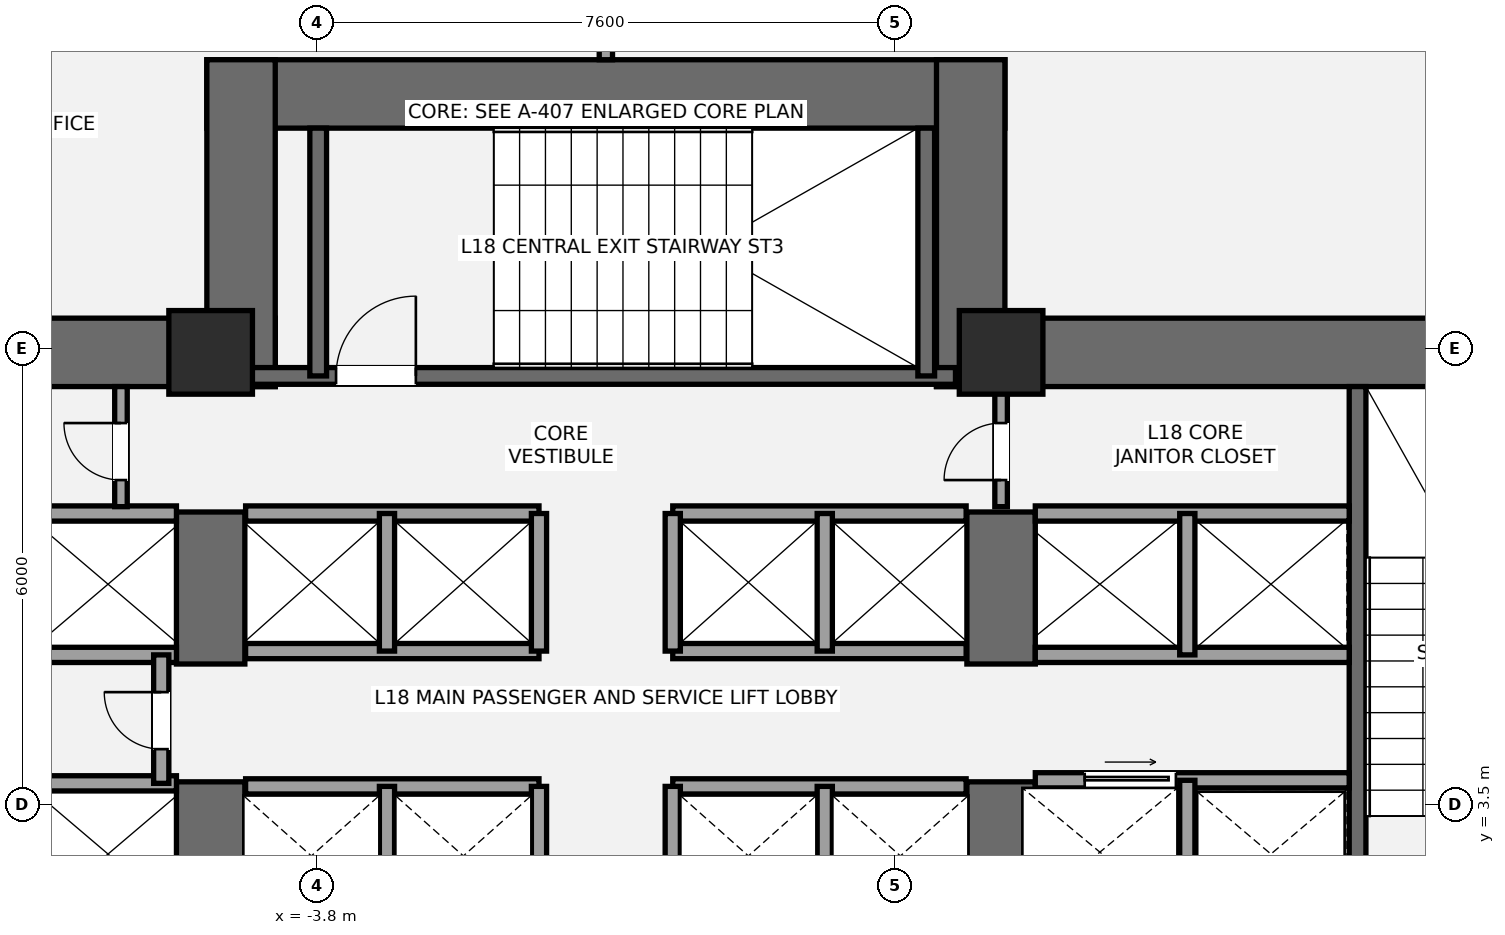
"""IFC4 building model, lengths in metres.
Left out: names, types, materials, properties, quantities, classifications, styles, units other than length and angle.
Written with IfcOpenShell. Run it as: python <this file> out.ifc"""

import sys

from ifc_helpers import new_model, si_unit, direction, frame, frame_2d, origin, origin_2d, place, context, subcontext, project, spatial, rectangle, extrude, element, fill, save


model = new_model("IFC4")
c1 = context("Model", 3, precision=1e-05, world=origin(), true_north=direction((0.0, 1.0)))
c2 = subcontext(c1, "Body", "Model", "MODEL_VIEW")
j1 = project(units=[si_unit("LENGTHUNIT", "METRE"), si_unit("PLANEANGLEUNIT", "RADIAN")], contexts=[c1])
p1 = place(None, origin())
s1 = spatial("IfcSite", under=j1, at=p1, CompositionType="ELEMENT")
p2 = place(p1, origin())
s2 = spatial("IfcBuilding", under=s1, at=p2, CompositionType="ELEMENT")
p3 = place(p2, frame((0.0, 0.0, 70.2)))
s3 = spatial("IfcBuildingStorey", under=s2, at=p3, CompositionType="ELEMENT", Elevation=70.2)
p4 = place(p3, frame((-14.05, 9.45, 0.0), z_axis=(0.0, 0.0, 1.0), x_axis=(1.0, 0.0, 0.0)))
e1 = element("IfcWall", 1, at=p4, inside=s3, PredefinedType="SHEAR", context=c2, shape_type="SweptSolid", body=[
    extrude(rectangle(XDim=9.7, YDim=0.9, at=frame_2d((4.85, 0.0))), origin(), (0.0, 0.0, 1.0), 3.6),
])
p5 = place(p3, frame((-5.2, 0.95, 0.0), z_axis=(0.0, 0.0, 1.0), x_axis=(0.0, 1.0, 0.0)))
e2 = element("IfcWall", 2, at=p5, inside=s3, PredefinedType="SHEAR", context=c2, shape_type="SweptSolid", body=[
    extrude(rectangle(XDim=2.85, YDim=0.9, at=frame_2d((1.425, 0.0))), origin(), (0.0, 0.0, 1.0), 3.6),
])
p6 = place(p3, frame((-5.2, 5.35, 0.0), z_axis=(0.0, 0.0, 1.0), x_axis=(0.0, 1.0, 0.0)))
e3 = element("IfcWall", 3, at=p6, inside=s3, PredefinedType="SHEAR", context=c2, shape_type="SweptSolid", body=[
    extrude(rectangle(XDim=2.0, YDim=0.9, at=frame_2d((1.0, 0.0))), origin(), (0.0, 0.0, 1.0), 3.6),
])
p7 = place(p3, frame((4.35, 9.45, 0.0), z_axis=(0.0, 0.0, 1.0), x_axis=(1.0, 0.0, 0.0)))
e4 = element("IfcWall", 4, at=p7, inside=s3, PredefinedType="SHEAR", context=c2, shape_type="SweptSolid", body=[
    extrude(rectangle(XDim=9.7, YDim=0.9, at=frame_2d((4.85, 0.0))), origin(), (0.0, 0.0, 1.0), 3.6),
])
p8 = place(p3, frame((5.2, 0.95, 0.0), z_axis=(0.0, 0.0, 1.0), x_axis=(0.0, 1.0, 0.0)))
e5 = element("IfcWall", 5, at=p8, inside=s3, PredefinedType="SHEAR", context=c2, shape_type="SweptSolid", body=[
    extrude(rectangle(XDim=2.85, YDim=0.9, at=frame_2d((1.425, 0.0))), origin(), (0.0, 0.0, 1.0), 3.6),
])
p9 = place(p3, frame((5.2, 5.35, 0.0), z_axis=(0.0, 0.0, 1.0), x_axis=(0.0, 1.0, 0.0)))
e6 = element("IfcWall", 6, at=p9, inside=s3, PredefinedType="SHEAR", context=c2, shape_type="SweptSolid", body=[
    extrude(rectangle(XDim=2.0, YDim=0.9, at=frame_2d((1.0, 0.0))), origin(), (0.0, 0.0, 1.0), 3.6),
])
p10 = place(p3, frame((9.89, 1.85, 0.0), z_axis=(0.0, 0.0, 1.0), x_axis=(0.0, 1.0, 0.0)))
e7 = element("IfcWall", 7, at=p10, inside=s3, PredefinedType="SHEAR", context=c2, shape_type="SweptSolid", body=[
    extrude(rectangle(XDim=7.15, YDim=0.22, at=frame_2d((3.575, 0.0))), origin(), (0.0, 0.0, 1.0), 3.6),
])
p11 = place(p3, frame((-5.25, 12.85, 0.0), z_axis=(0.0, 0.0, 1.0), x_axis=(1.0, 0.0, 0.0)))
e8 = element("IfcWall", 8, at=p11, inside=s3, PredefinedType="SHEAR", context=c2, shape_type="SweptSolid", body=[
    extrude(rectangle(XDim=10.5, YDim=0.9, at=frame_2d((5.25, 0.0))), origin(), (0.0, 0.0, 1.0), 3.6),
])
for number, where, z_axis, x_axis in (
    (9, (-4.8, 9.0, 0.0), (0.0, 0.0, 1.0), (0.0, 1.0, 0.0)),
    (10, (4.8, 9.0, 0.0), (0.0, 0.0, 1.0), (0.0, 1.0, 0.0)),
):
    element("IfcWall", number, at=place(p3, frame(where, z_axis=z_axis, x_axis=x_axis)), inside=s3, PredefinedType="SHEAR", context=c2, shape_type="SweptSolid", body=[
        extrude(rectangle(XDim=4.3, YDim=0.9, at=frame_2d((2.15, 0.0))), origin(), (0.0, 0.0, 1.0), 3.6),
    ])
p12 = place(p3, frame((-4.7, 9.14, 0.0), z_axis=(0.0, 0.0, 1.0), x_axis=(1.0, 0.0, 0.0)))
e11 = element("IfcWall", 11, at=p12, inside=s3, PredefinedType="SHEAR", context=c2, shape_type="SweptSolid", body=[
    extrude(rectangle(XDim=9.3, YDim=0.22, at=frame_2d((4.65, 0.0))), origin(), (0.0, 0.0, 1.0), 3.6),
])
p13 = place(p12, frame((1.15, 0.0, 0.0)))
e12 = element("IfcOpeningElement", 12, at=p13, cuts=e11, PredefinedType="OPENING", context=c2, shape_type="SweptSolid", body=[
    extrude(rectangle(XDim=1.05, YDim=2.15, at=frame_2d((0.525, 1.075))), frame((0.0, 0.12, 0.0), z_axis=(0.0, -1.0, 0.0), x_axis=(1.0, 0.0, 0.0)), (0.0, 0.0, 1.0), 0.24),
])
for number, where, z_axis, x_axis in (
    (13, (-3.785, 9.14, 0.0), (0.0, 0.0, 1.0), (0.0, 1.0, 0.0)),
    (14, (4.215, 9.14, 0.0), (0.0, 0.0, 1.0), (0.0, 1.0, 0.0)),
):
    element("IfcWall", number, at=place(p3, frame(where, z_axis=z_axis, x_axis=x_axis)), inside=s3, PredefinedType="SHEAR", context=c2, shape_type="SweptSolid", body=[
        extrude(rectangle(XDim=3.26, YDim=0.22, at=frame_2d((1.63, 0.0))), origin(), (0.0, 0.0, 1.0), 3.6),
    ])
for number, where, z_axis, x_axis in (
    (15, (-5.2, 9.45, 0.0), (0.0, 0.0, 1.0), (1.0, 0.0, 0.0)),
    (16, (5.2, 9.45, 0.0), (0.0, 0.0, 1.0), (1.0, 0.0, 0.0)),
):
    element("IfcColumn", number, at=place(p3, frame(where, z_axis=z_axis, x_axis=x_axis)), inside=s3, PredefinedType="COLUMN", context=c2, shape_type="SweptSolid", body=[
        extrude(rectangle(XDim=1.1, YDim=1.1, at=origin_2d()), origin(), (0.0, 0.0, 1.0), 3.6),
    ])
for number, where, z_axis, x_axis in (
    (17, (-9.78, 3.78, 0.0), (0.0, 0.0, 1.0), (1.0, 0.0, 0.0)),
    (18, (-9.78, 5.47, 0.0), (0.0, 0.0, 1.0), (1.0, 0.0, 0.0)),
    (19, (-9.78, 7.33, 0.0), (0.0, 0.0, 1.0), (1.0, 0.0, 0.0)),
):
    element("IfcWall", number, at=place(p3, frame(where, z_axis=z_axis, x_axis=x_axis)), inside=s3, PredefinedType="SOLIDWALL", context=c2, shape_type="SweptSolid", body=[
        extrude(rectangle(XDim=4.13, YDim=0.2, at=frame_2d((2.065, 0.0))), origin(), (0.0, 0.0, 1.0), 3.4),
    ])
p14 = place(p3, frame((-5.85, 3.78, 0.0), z_axis=(0.0, 0.0, 1.0), x_axis=(0.0, 1.0, 0.0)))
e20 = element("IfcWall", 20, at=p14, inside=s3, PredefinedType="SOLIDWALL", context=c2, shape_type="SweptSolid", body=[
    extrude(rectangle(XDim=1.69, YDim=0.2, at=frame_2d((0.845, 0.0))), origin(), (0.0, 0.0, 1.0), 3.4),
])
p15 = place(p14, frame((0.45, 0.0, 0.0)))
e21 = element("IfcOpeningElement", 21, at=p15, cuts=e20, PredefinedType="OPENING", context=c2, shape_type="SweptSolid", body=[
    extrude(rectangle(XDim=0.75, YDim=2.1, at=frame_2d((0.375, 1.05))), frame((0.0, 0.11, 0.0), z_axis=(0.0, -1.0, 0.0), x_axis=(1.0, 0.0, 0.0)), (0.0, 0.0, 1.0), 0.22),
])
p16 = place(p3, frame((5.65, 3.82, 0.0), z_axis=(0.0, 0.0, 1.0), x_axis=(1.0, 0.0, 0.0)))
e22 = element("IfcWall", 22, at=p16, inside=s3, PredefinedType="SOLIDWALL", context=c2, shape_type="SweptSolid", body=[
    extrude(rectangle(XDim=4.13, YDim=0.2, at=frame_2d((2.065, 0.0))), origin(), (0.0, 0.0, 1.0), 3.4),
])
p17 = place(p16, frame((0.65, 0.0, 0.0)))
e23 = element("IfcOpeningElement", 23, at=p17, cuts=e22, PredefinedType="OPENING", context=c2, shape_type="SweptSolid", body=[
    extrude(rectangle(XDim=1.2, YDim=2.2, at=frame_2d((0.6, 1.1))), frame((0.0, 0.11, 0.0), z_axis=(0.0, -1.0, 0.0), x_axis=(1.0, 0.0, 0.0)), (0.0, 0.0, 1.0), 0.22),
])
p18 = place(p3, frame((7.65, 1.85, 0.0), z_axis=(0.0, 0.0, 1.0), x_axis=(0.0, 1.0, 0.0)))
e24 = element("IfcWall", 24, at=p18, inside=s3, PredefinedType="SOLIDWALL", context=c2, shape_type="SweptSolid", body=[
    extrude(rectangle(XDim=1.97, YDim=0.2, at=frame_2d((0.985, 0.0))), origin(), (0.0, 0.0, 1.0), 3.4),
])
for number, where, z_axis, x_axis in (
    (25, (5.65, 5.47, 0.0), (0.0, 0.0, 1.0), (1.0, 0.0, 0.0)),
    (26, (5.65, 7.33, 0.0), (0.0, 0.0, 1.0), (1.0, 0.0, 0.0)),
):
    element("IfcWall", number, at=place(p3, frame(where, z_axis=z_axis, x_axis=x_axis)), inside=s3, PredefinedType="SOLIDWALL", context=c2, shape_type="SweptSolid", body=[
        extrude(rectangle(XDim=4.13, YDim=0.2, at=frame_2d((2.065, 0.0))), origin(), (0.0, 0.0, 1.0), 3.4),
    ])
p19 = place(p3, frame((7.65, 5.47, 0.0), z_axis=(0.0, 0.0, 1.0), x_axis=(0.0, 1.0, 0.0)))
e27 = element("IfcWall", 27, at=p19, inside=s3, PredefinedType="SOLIDWALL", context=c2, shape_type="SweptSolid", body=[
    extrude(rectangle(XDim=1.86, YDim=0.2, at=frame_2d((0.93, 0.0))), origin(), (0.0, 0.0, 1.0), 3.4),
])
for number, where, z_axis, x_axis in (
    (28, (-4.74, 3.74, 0.0), (0.0, 0.0, 1.0), (1.0, 0.0, 0.0)),
    (29, (0.88, 3.74, 0.0), (0.0, 0.0, 1.0), (1.0, 0.0, 0.0)),
):
    element("IfcWall", number, at=place(p3, frame(where, z_axis=z_axis, x_axis=x_axis)), inside=s3, PredefinedType="SOLIDWALL", context=c2, shape_type="SweptSolid", body=[
        extrude(rectangle(XDim=3.86, YDim=0.2, at=frame_2d((1.93, 0.0))), origin(), (0.0, 0.0, 1.0), 3.4),
    ])
for number, where, z_axis, x_axis in (
    (30, (-2.88, 1.92, 0.0), (0.0, 0.0, 1.0), (0.0, 1.0, 0.0)),
    (31, (2.88, 1.92, 0.0), (0.0, 0.0, 1.0), (0.0, 1.0, 0.0)),
    (32, (-0.88, 1.92, 0.0), (0.0, 0.0, 1.0), (0.0, 1.0, 0.0)),
    (33, (0.88, 1.92, 0.0), (0.0, 0.0, 1.0), (0.0, 1.0, 0.0)),
):
    element("IfcWall", number, at=place(p3, frame(where, z_axis=z_axis, x_axis=x_axis)), inside=s3, PredefinedType="SOLIDWALL", context=c2, shape_type="SweptSolid", body=[
        extrude(rectangle(XDim=1.82, YDim=0.2, at=frame_2d((0.91, 0.0))), origin(), (0.0, 0.0, 1.0), 3.4),
    ])
for number, where, z_axis, x_axis in (
    (34, (-4.74, 5.52, 0.0), (0.0, 0.0, 1.0), (1.0, 0.0, 0.0)),
    (35, (0.88, 5.52, 0.0), (0.0, 0.0, 1.0), (1.0, 0.0, 0.0)),
    (36, (-4.74, 7.33, 0.0), (0.0, 0.0, 1.0), (1.0, 0.0, 0.0)),
    (37, (0.88, 7.33, 0.0), (0.0, 0.0, 1.0), (1.0, 0.0, 0.0)),
):
    element("IfcWall", number, at=place(p3, frame(where, z_axis=z_axis, x_axis=x_axis)), inside=s3, PredefinedType="SOLIDWALL", context=c2, shape_type="SweptSolid", body=[
        extrude(rectangle(XDim=3.86, YDim=0.2, at=frame_2d((1.93, 0.0))), origin(), (0.0, 0.0, 1.0), 3.4),
    ])
for number, where, z_axis, x_axis in (
    (38, (-2.88, 5.52, 0.0), (0.0, 0.0, 1.0), (0.0, 1.0, 0.0)),
    (39, (2.88, 5.52, 0.0), (0.0, 0.0, 1.0), (0.0, 1.0, 0.0)),
    (40, (-0.88, 5.52, 0.0), (0.0, 0.0, 1.0), (0.0, 1.0, 0.0)),
    (41, (0.88, 5.52, 0.0), (0.0, 0.0, 1.0), (0.0, 1.0, 0.0)),
):
    element("IfcWall", number, at=place(p3, frame(where, z_axis=z_axis, x_axis=x_axis)), inside=s3, PredefinedType="SOLIDWALL", context=c2, shape_type="SweptSolid", body=[
        extrude(rectangle(XDim=1.81, YDim=0.2, at=frame_2d((0.905, 0.0))), origin(), (0.0, 0.0, 1.0), 3.4),
    ])
p20 = place(p3, frame((-6.38, 7.42, 0.0), z_axis=(0.0, 0.0, 1.0), x_axis=(0.0, 1.0, 0.0)))
e42 = element("IfcWall", 42, at=p20, inside=s3, PredefinedType="PARTITIONING", context=c2, shape_type="SweptSolid", body=[
    extrude(rectangle(XDim=1.58, YDim=0.165, at=frame_2d((0.79, 0.0))), origin(), (0.0, 0.0, 1.0), 3.4),
])
p21 = place(p20, frame((0.35, 0.0, 0.0)))
e43 = element("IfcOpeningElement", 43, at=p21, cuts=e42, PredefinedType="OPENING", context=c2, shape_type="SweptSolid", body=[
    extrude(rectangle(XDim=0.75, YDim=2.1, at=frame_2d((0.375, 1.05))), frame((0.0, 0.093, 0.0), z_axis=(0.0, -1.0, 0.0), x_axis=(1.0, 0.0, 0.0)), (0.0, 0.0, 1.0), 0.185),
])
p22 = place(p3, frame((5.2, 7.42, 0.0), z_axis=(0.0, 0.0, 1.0), x_axis=(0.0, 1.0, 0.0)))
e44 = element("IfcWall", 44, at=p22, inside=s3, PredefinedType="PARTITIONING", context=c2, shape_type="SweptSolid", body=[
    extrude(rectangle(XDim=1.58, YDim=0.165, at=frame_2d((0.79, 0.0))), origin(), (0.0, 0.0, 1.0), 3.4),
])
p23 = place(p22, frame((0.35, 0.0, 0.0)))
e45 = element("IfcOpeningElement", 45, at=p23, cuts=e44, PredefinedType="OPENING", context=c2, shape_type="SweptSolid", body=[
    extrude(rectangle(XDim=0.75, YDim=2.1, at=frame_2d((0.375, 1.05))), frame((0.0, 0.093, 0.0), z_axis=(0.0, -1.0, 0.0), x_axis=(1.0, 0.0, 0.0)), (0.0, 0.0, 1.0), 0.185),
])
p24 = place(p3, frame((0.0, 13.3, 0.0), z_axis=(0.0, 0.0, 1.0), x_axis=(0.0, 1.0, 0.0)))
e46 = element("IfcWall", 46, at=p24, inside=s3, PredefinedType="PARTITIONING", context=c2, shape_type="SweptSolid", body=[
    extrude(rectangle(XDim=4.31, YDim=0.175, at=frame_2d((2.155, 0.0))), origin(), (0.0, 0.0, 1.0), 3.4),
])
p25 = place(p13, origin())
e47 = element("IfcDoor", 47, at=p25, inside=s3, OperationType="SINGLE_SWING_RIGHT", PredefinedType="DOOR", context=c2, shape_type="SweptSolid", body=[
    extrude(rectangle(XDim=1.05, YDim=2.15, at=frame_2d((0.525, 1.075))), frame((0.0, 0.025, 0.0), z_axis=(0.0, -1.0, 0.0), x_axis=(1.0, 0.0, 0.0)), (0.0, 0.0, 1.0), 0.05),
])
fill(e12, e47)
p26 = place(p15, origin())
e48 = element("IfcDoor", 48, at=p26, inside=s3, OperationType="SINGLE_SWING_RIGHT", PredefinedType="DOOR", context=c2, shape_type="SweptSolid", body=[
    extrude(rectangle(XDim=0.75, YDim=2.1, at=frame_2d((0.375, 1.05))), frame((0.0, 0.025, 0.0), z_axis=(0.0, -1.0, 0.0), x_axis=(1.0, 0.0, 0.0)), (0.0, 0.0, 1.0), 0.05),
])
fill(e21, e48)
p27 = place(p17, origin())
e49 = element("IfcDoor", 49, at=p27, inside=s3, OperationType="SLIDING_TO_RIGHT", PredefinedType="DOOR", context=c2, shape_type="SweptSolid", body=[
    extrude(rectangle(XDim=1.2, YDim=2.2, at=frame_2d((0.6, 1.1))), frame((0.0, 0.025, 0.0), z_axis=(0.0, -1.0, 0.0), x_axis=(1.0, 0.0, 0.0)), (0.0, 0.0, 1.0), 0.05),
])
fill(e23, e49)
p28 = place(p21, origin())
e50 = element("IfcDoor", 50, at=p28, inside=s3, OperationType="SINGLE_SWING_RIGHT", PredefinedType="DOOR", context=c2, shape_type="SweptSolid", body=[
    extrude(rectangle(XDim=0.75, YDim=2.1, at=frame_2d((0.375, 1.05))), frame((0.0, 0.025, 0.0), z_axis=(0.0, -1.0, 0.0), x_axis=(1.0, 0.0, 0.0)), (0.0, 0.0, 1.0), 0.05),
])
fill(e43, e50)
p29 = place(p23, origin())
e51 = element("IfcDoor", 51, at=p29, inside=s3, OperationType="SINGLE_SWING_LEFT", PredefinedType="DOOR", context=c2, shape_type="SweptSolid", body=[
    extrude(rectangle(XDim=0.75, YDim=2.1, at=frame_2d((0.375, 1.05))), frame((0.0, 0.025, 0.0), z_axis=(0.0, -1.0, 0.0), x_axis=(1.0, 0.0, 0.0)), (0.0, 0.0, 1.0), 0.05),
])
fill(e45, e51)
save(model, sys.argv[1])
